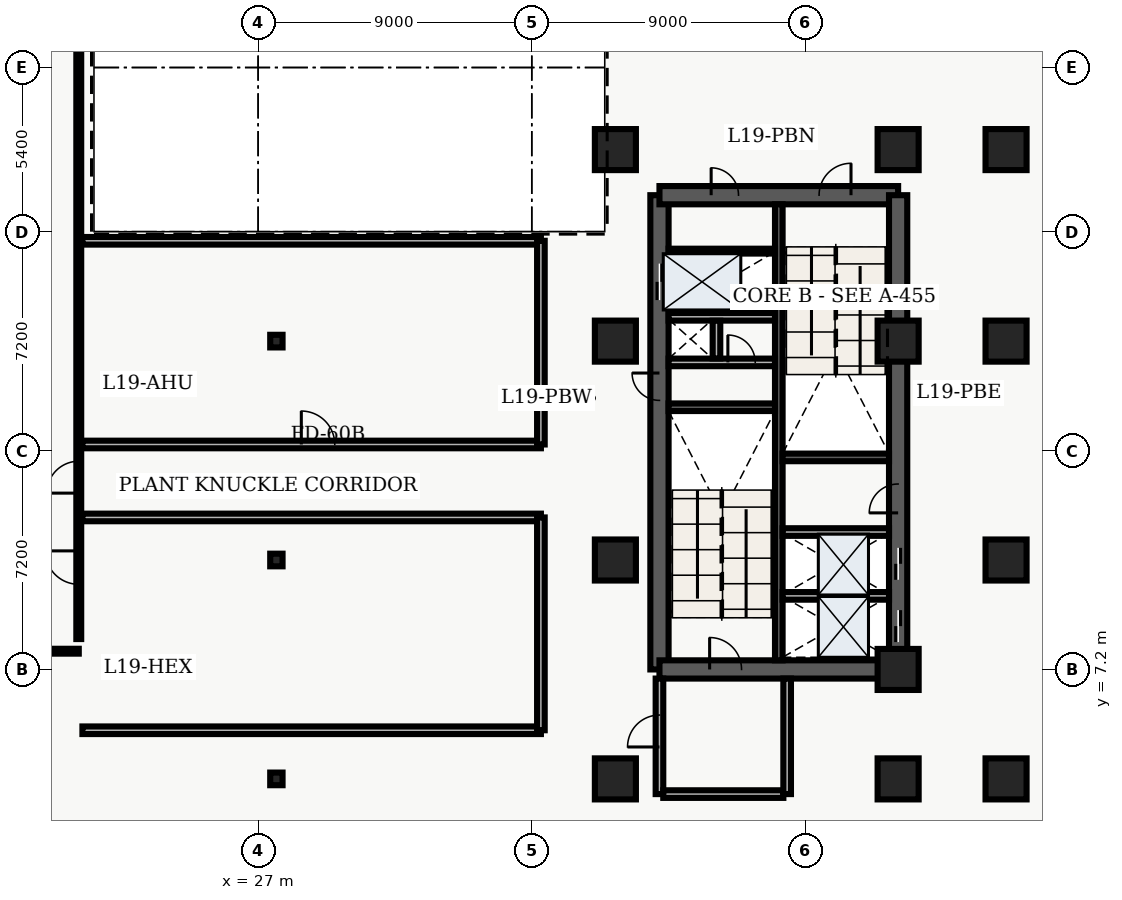
"""IFC4 building model, lengths in metres.
Left out: names, types, materials, properties, quantities, classifications, styles, units other than length and angle.
Written with IfcOpenShell. Run it as: python <this file> out.ifc"""

import sys

from ifc_helpers import new_model, entity, si_unit, converted_unit, direction, frame, origin_with_axes, origin_2d_with_axis, place, context, subcontext, project, spatial, polyline, rectangle, i_section, outline, extrude, element, fill, save


model = new_model("IFC4")
c1 = context("Model", 3, precision=1e-05, world=origin_with_axes(), true_north=direction((0.0, 1.0)))
c2 = subcontext(c1, "Body", "Model", "MODEL_VIEW")
j1 = project(units=[si_unit("LENGTHUNIT", "METRE"), converted_unit("PLANEANGLEUNIT", "DEGREE", entity("IfcPlaneAngleMeasure", 0.017), si_unit("PLANEANGLEUNIT", "RADIAN"), dimensions=[0, 0, 0, 0, 0, 0, 0])], contexts=[c1])
p1 = place(None, origin_with_axes())
s1 = spatial("IfcSite", under=j1, at=p1, CompositionType="ELEMENT")
p2 = place(p1, origin_with_axes())
s2 = spatial("IfcBuilding", under=s1, at=p2, CompositionType="ELEMENT")
p3 = place(p2, frame((0.0, 0.0, 79.5), z_axis=(0.0, 0.0, 1.0), x_axis=(1.0, 0.0, 0.0)))
s3 = spatial("IfcBuildingStorey", under=s2, at=p3, CompositionType="ELEMENT", Elevation=79.5)
p4 = place(p3, frame((40.2, 7.2, 0.0), z_axis=(0.0, 0.0, 1.0), x_axis=(0.0, 1.0, 0.0)))
e1 = element("IfcWall", 1, at=p4, inside=s3, PredefinedType="SHEAR", context=c2, shape_type="SweptSolid", body=[
    extrude(outline(polyline([(0.0, -0.3), (15.6, -0.3), (15.6, 0.3), (0.0, 0.3), (0.0, -0.3)])), origin_with_axes(), (0.0, 0.0, 1.0), 4.86),
])
p5 = place(p4, frame((12.75, 0.0, 0.0), z_axis=(0.0, 0.0, 1.0), x_axis=(1.0, 0.0, 0.0)))
e2 = element("IfcOpeningElement", 2, at=p5, cuts=e1, PredefinedType="OPENING", context=c2, shape_type="SweptSolid", body=[
    extrude(rectangle(XDim=1.2, YDim=0.62, at=origin_2d_with_axis()), origin_with_axes(), (0.0, 0.0, 1.0), 2.15),
])
p6 = place(p4, frame((9.3, 0.0, 0.0), z_axis=(0.0, 0.0, 1.0), x_axis=(1.0, 0.0, 0.0)))
e3 = element("IfcOpeningElement", 3, at=p6, cuts=e1, PredefinedType="OPENING", context=c2, shape_type="SweptSolid", body=[
    extrude(rectangle(XDim=0.9, YDim=0.62, at=origin_2d_with_axis()), origin_with_axes(), (0.0, 0.0, 1.0), 2.15),
])
p7 = place(p3, frame((40.2, 7.2, 0.0), z_axis=(0.0, 0.0, 1.0), x_axis=(1.0, 0.0, 0.0)))
e4 = element("IfcWall", 4, at=p7, inside=s3, PredefinedType="SHEAR", context=c2, shape_type="SweptSolid", body=[
    extrude(outline(polyline([(0.0, -0.3), (7.85, -0.3), (7.85, 0.3), (0.0, 0.3), (0.0, -0.3)])), origin_with_axes(), (0.0, 0.0, 1.0), 4.86),
])
p8 = place(p7, frame((2.175, 0.0, 0.0), z_axis=(0.0, 0.0, 1.0), x_axis=(1.0, 0.0, 0.0)))
e5 = element("IfcOpeningElement", 5, at=p8, cuts=e4, PredefinedType="OPENING", context=c2, shape_type="SweptSolid", body=[
    extrude(rectangle(XDim=1.05, YDim=0.62, at=origin_2d_with_axis()), origin_with_axes(), (0.0, 0.0, 1.0), 2.15),
])
p9 = place(p3, frame((40.2, 22.8, 0.0), z_axis=(0.0, 0.0, 1.0), x_axis=(1.0, 0.0, 0.0)))
e6 = element("IfcWall", 6, at=p9, inside=s3, PredefinedType="SHEAR", context=c2, shape_type="SweptSolid", body=[
    extrude(outline(polyline([(0.0, -0.3), (7.85, -0.3), (7.85, 0.3), (0.0, 0.3), (0.0, -0.3)])), origin_with_axes(), (0.0, 0.0, 1.0), 4.86),
])
p10 = place(p9, frame((5.775, 0.0, 0.0), z_axis=(0.0, 0.0, 1.0), x_axis=(1.0, 0.0, 0.0)))
e7 = element("IfcOpeningElement", 7, at=p10, cuts=e6, PredefinedType="OPENING", context=c2, shape_type="SweptSolid", body=[
    extrude(rectangle(XDim=1.05, YDim=0.62, at=origin_2d_with_axis()), origin_with_axes(), (0.0, 0.0, 1.0), 2.15),
])
p11 = place(p9, frame((2.15, 0.0, 0.0), z_axis=(0.0, 0.0, 1.0), x_axis=(1.0, 0.0, 0.0)))
e8 = element("IfcOpeningElement", 8, at=p11, cuts=e6, PredefinedType="OPENING", context=c2, shape_type="SweptSolid", body=[
    extrude(rectangle(XDim=0.9, YDim=0.62, at=origin_2d_with_axis()), origin_with_axes(), (0.0, 0.0, 1.0), 2.15),
])
p12 = place(p3, frame((48.05, 7.2, 0.0), z_axis=(0.0, 0.0, 1.0), x_axis=(0.0, 1.0, 0.0)))
e9 = element("IfcWall", 9, at=p12, inside=s3, PredefinedType="SHEAR", context=c2, shape_type="SweptSolid", body=[
    extrude(outline(polyline([(0.0, -0.3), (15.6, -0.3), (15.6, 0.3), (0.0, 0.3), (0.0, -0.3)])), origin_with_axes(), (0.0, 0.0, 1.0), 4.86),
])
p13 = place(p12, frame((1.425, 0.0, 0.0), z_axis=(0.0, 0.0, 1.0), x_axis=(1.0, 0.0, 0.0)))
e10 = element("IfcOpeningElement", 10, at=p13, cuts=e9, PredefinedType="OPENING", context=c2, shape_type="SweptSolid", body=[
    extrude(rectangle(XDim=1.05, YDim=0.62, at=origin_2d_with_axis()), origin_with_axes(), (0.0, 0.0, 1.0), 2.15),
])
p14 = place(p12, frame((3.475, 0.0, 0.0), z_axis=(0.0, 0.0, 1.0), x_axis=(1.0, 0.0, 0.0)))
e11 = element("IfcOpeningElement", 11, at=p14, cuts=e9, PredefinedType="OPENING", context=c2, shape_type="SweptSolid", body=[
    extrude(rectangle(XDim=1.05, YDim=0.62, at=origin_2d_with_axis()), origin_with_axes(), (0.0, 0.0, 1.0), 2.15),
])
p15 = place(p12, frame((5.625, 0.0, 0.0), z_axis=(0.0, 0.0, 1.0), x_axis=(1.0, 0.0, 0.0)))
e12 = element("IfcOpeningElement", 12, at=p15, cuts=e9, PredefinedType="OPENING", context=c2, shape_type="SweptSolid", body=[
    extrude(rectangle(XDim=0.95, YDim=0.62, at=origin_2d_with_axis()), origin_with_axes(), (0.0, 0.0, 1.0), 2.15),
])
p16 = place(p3, frame((44.125, 7.5, 0.0), z_axis=(0.0, 0.0, 1.0), x_axis=(0.0, 1.0, 0.0)))
e13 = element("IfcWall", 13, at=p16, inside=s3, PredefinedType="SHEAR", context=c2, shape_type="SweptSolid", body=[
    extrude(outline(polyline([(0.0, -0.125), (15.0, -0.125), (15.0, 0.125), (0.0, 0.125), (0.0, -0.125)])), origin_with_axes(), (0.0, 0.0, 1.0), 4.86),
])
for number, where, z_axis, x_axis in (
    (14, (40.5, 15.825, 0.0), (0.0, 0.0, 1.0), (1.0, 0.0, 0.0)),
    (15, (44.25, 14.175, 0.0), (0.0, 0.0, 1.0), (1.0, 0.0, 0.0)),
):
    element("IfcWall", number, at=place(p3, frame(where, z_axis=z_axis, x_axis=x_axis)), inside=s3, PredefinedType="SHEAR", context=c2, shape_type="SweptSolid", body=[
        extrude(outline(polyline([(0.0, -0.125), (3.5, -0.125), (3.5, 0.125), (0.0, 0.125), (0.0, -0.125)])), origin_with_axes(), (0.0, 0.0, 1.0), 4.86),
    ])
p17 = place(p3, frame((40.5, 17.3, 0.0), z_axis=(0.0, 0.0, 1.0), x_axis=(1.0, 0.0, 0.0)))
e16 = element("IfcWall", 16, at=p17, inside=s3, PredefinedType="SOLIDWALL", context=c2, shape_type="SweptSolid", body=[
    extrude(outline(polyline([(0.0, -0.125), (3.5, -0.125), (3.5, 0.125), (0.0, 0.125), (0.0, -0.125)])), origin_with_axes(), (0.0, 0.0, 1.0), 3.6),
])
p18 = place(p17, frame((2.4, 0.0, 0.0), z_axis=(0.0, 0.0, 1.0), x_axis=(1.0, 0.0, 0.0)))
e17 = element("IfcOpeningElement", 17, at=p18, cuts=e16, PredefinedType="OPENING", context=c2, shape_type="SweptSolid", body=[
    extrude(rectangle(XDim=0.9, YDim=0.27, at=origin_2d_with_axis()), origin_with_axes(), (0.0, 0.0, 1.0), 2.15),
])
p19 = place(p3, frame((40.5, 18.8, 0.0), z_axis=(0.0, 0.0, 1.0), x_axis=(1.0, 0.0, 0.0)))
e18 = element("IfcWall", 18, at=p19, inside=s3, PredefinedType="SOLIDWALL", context=c2, shape_type="SweptSolid", body=[
    extrude(outline(polyline([(0.0, -0.125), (3.5, -0.125), (3.5, 0.125), (0.0, 0.125), (0.0, -0.125)])), origin_with_axes(), (0.0, 0.0, 1.0), 3.6),
])
p20 = place(p3, frame((42.075, 17.43, 0.0), z_axis=(0.0, 0.0, 1.0), x_axis=(0.0, 1.0, 0.0)))
e19 = element("IfcWall", 19, at=p20, inside=s3, PredefinedType="SOLIDWALL", context=c2, shape_type="SweptSolid", body=[
    extrude(outline(polyline([(0.0, -0.125), (1.24, -0.125), (1.24, 0.125), (0.0, 0.125), (0.0, -0.125)])), origin_with_axes(), (0.0, 0.0, 1.0), 3.6),
])
p21 = place(p3, frame((40.2, 3.1, 0.0), z_axis=(0.0, 0.0, 1.0), x_axis=(0.0, 1.0, 0.0)))
e20 = element("IfcWall", 20, at=p21, inside=s3, PredefinedType="SOLIDWALL", context=c2, shape_type="SweptSolid", body=[
    extrude(outline(polyline([(0.0, -0.125), (3.8, -0.125), (3.8, 0.125), (0.0, 0.125), (0.0, -0.125)])), origin_with_axes(), (0.0, 0.0, 1.0), 3.6),
])
p22 = place(p21, frame((2.075, 0.0, 0.0), z_axis=(0.0, 0.0, 1.0), x_axis=(1.0, 0.0, 0.0)))
e21 = element("IfcOpeningElement", 21, at=p22, cuts=e20, PredefinedType="OPENING", context=c2, shape_type="SweptSolid", body=[
    extrude(rectangle(XDim=1.05, YDim=0.27, at=origin_2d_with_axis()), origin_with_axes(), (0.0, 0.0, 1.0), 2.15),
])
p23 = place(p3, frame((40.325, 3.1, 0.0), z_axis=(0.0, 0.0, 1.0), x_axis=(1.0, 0.0, 0.0)))
e22 = element("IfcWall", 22, at=p23, inside=s3, PredefinedType="SOLIDWALL", context=c2, shape_type="SweptSolid", body=[
    extrude(outline(polyline([(0.0, -0.125), (3.95, -0.125), (3.95, 0.125), (0.0, 0.125), (0.0, -0.125)])), origin_with_axes(), (0.0, 0.0, 1.0), 3.6),
])
p24 = place(p3, frame((44.4, 3.1, 0.0), z_axis=(0.0, 0.0, 1.0), x_axis=(0.0, 1.0, 0.0)))
e23 = element("IfcWall", 23, at=p24, inside=s3, PredefinedType="SOLIDWALL", context=c2, shape_type="SweptSolid", body=[
    extrude(outline(polyline([(0.0, -0.125), (3.8, -0.125), (3.8, 0.125), (0.0, 0.125), (0.0, -0.125)])), origin_with_axes(), (0.0, 0.0, 1.0), 3.6),
])
for number, where, z_axis, x_axis in (
    (24, (27.6, 3.6, 0.0), (0.0, 0.0, 1.0), (1.0, 0.0, 0.0)),
    (25, (27.6, 10.8, 0.0), (0.0, 0.0, 1.0), (1.0, 0.0, 0.0)),
    (26, (27.6, 18.0, 0.0), (0.0, 0.0, 1.0), (1.0, 0.0, 0.0)),
):
    element("IfcColumn", number, at=place(p3, frame(where, z_axis=z_axis, x_axis=x_axis)), inside=s3, PredefinedType="COLUMN", context=c2, shape_type="SweptSolid", body=[
        extrude(i_section(OverallWidth=0.406, OverallDepth=0.416, WebThickness=0.03, FlangeThickness=0.048, FilletRadius=0.022, at=origin_2d_with_axis()), origin_with_axes(), (0.0, 0.0, 1.0), 5.1),
    ])
for number, where, z_axis, x_axis in (
    (27, (38.75, 3.6, 0.0), (0.0, 0.0, 1.0), (1.0, 0.0, 0.0)),
    (28, (38.75, 10.8, 0.0), (0.0, 0.0, 1.0), (1.0, 0.0, 0.0)),
    (29, (38.75, 18.0, 0.0), (0.0, 0.0, 1.0), (1.0, 0.0, 0.0)),
    (30, (38.75, 24.3, 0.0), (0.0, 0.0, 1.0), (1.0, 0.0, 0.0)),
    (31, (48.05, 3.6, 0.0), (0.0, 0.0, 1.0), (1.0, 0.0, 0.0)),
    (32, (48.05, 7.2, 0.0), (0.0, 0.0, 1.0), (1.0, 0.0, 0.0)),
    (33, (48.05, 18.0, 0.0), (0.0, 0.0, 1.0), (1.0, 0.0, 0.0)),
    (34, (48.05, 24.3, 0.0), (0.0, 0.0, 1.0), (1.0, 0.0, 0.0)),
    (35, (51.6, 3.6, 0.0), (0.0, 0.0, 1.0), (1.0, 0.0, 0.0)),
    (36, (51.6, 10.8, 0.0), (0.0, 0.0, 1.0), (1.0, 0.0, 0.0)),
    (37, (51.6, 18.0, 0.0), (0.0, 0.0, 1.0), (1.0, 0.0, 0.0)),
    (38, (51.6, 24.3, 0.0), (0.0, 0.0, 1.0), (1.0, 0.0, 0.0)),
):
    element("IfcColumn", number, at=place(p3, frame(where, z_axis=z_axis, x_axis=x_axis)), inside=s3, PredefinedType="COLUMN", context=c2, shape_type="SweptSolid", body=[
        extrude(rectangle(XDim=1.35, YDim=1.35, at=origin_2d_with_axis()), origin_with_axes(), (0.0, 0.0, 1.0), 5.1),
    ])
p25 = place(p3, frame((40.5, 20.96, 0.0), z_axis=(0.0, 0.0, 1.0), x_axis=(1.0, 0.0, 0.0)))
e39 = element("IfcWall", 39, at=p25, inside=s3, PredefinedType="PARTITIONING", context=c2, shape_type="SweptSolid", body=[
    extrude(outline(polyline([(0.0, -0.08), (3.5, -0.08), (3.5, 0.08), (0.0, 0.08), (0.0, -0.08)])), origin_with_axes(), (0.0, 0.0, 1.0), 3.2),
])
for number, where, z_axis, x_axis in (
    (40, (44.25, 9.62, 0.0), (0.0, 0.0, 1.0), (1.0, 0.0, 0.0)),
    (41, (44.25, 11.72, 0.0), (0.0, 0.0, 1.0), (1.0, 0.0, 0.0)),
):
    element("IfcWall", number, at=place(p3, frame(where, z_axis=z_axis, x_axis=x_axis)), inside=s3, PredefinedType="SOLIDWALL", context=c2, shape_type="SweptSolid", body=[
        extrude(outline(polyline([(0.0, -0.125), (3.5, -0.125), (3.5, 0.125), (0.0, 0.125), (0.0, -0.125)])), origin_with_axes(), (0.0, 0.0, 1.0), 3.2),
    ])
p26 = place(p3, frame((21.1, 8.2, 0.0), z_axis=(0.0, 0.0, 1.0), x_axis=(0.0, 1.0, 0.0)))
e42 = element("IfcWall", 42, at=p26, inside=s3, PredefinedType="PARTITIONING", context=c2, shape_type="SweptSolid", body=[
    extrude(outline(polyline([(0.0, -0.08), (32.0, -0.08), (32.0, 0.08), (0.0, 0.08), (0.0, -0.08)])), origin_with_axes(), (0.0, 0.0, 1.0), 3.2),
])
p27 = place(p26, frame((5.325, 0.0, 0.0), z_axis=(0.0, 0.0, 1.0), x_axis=(1.0, 0.0, 0.0)))
e43 = element("IfcOpeningElement", 43, at=p27, cuts=e42, PredefinedType="OPENING", context=c2, shape_type="SweptSolid", body=[
    extrude(rectangle(XDim=1.05, YDim=0.18, at=origin_2d_with_axis()), origin_with_axes(), (0.0, 0.0, 1.0), 2.15),
])
p28 = place(p26, frame((2.35, 0.0, 0.0), z_axis=(0.0, 0.0, 1.0), x_axis=(1.0, 0.0, 0.0)))
e44 = element("IfcOpeningElement", 44, at=p28, cuts=e42, PredefinedType="OPENING", context=c2, shape_type="SweptSolid", body=[
    extrude(rectangle(XDim=1.1, YDim=0.18, at=origin_2d_with_axis()), origin_with_axes(), (0.0, 0.0, 1.0), 2.15),
])
p29 = place(p3, frame((4.8, 7.8, 0.0), z_axis=(0.0, 0.0, 1.0), x_axis=(1.0, 0.0, 0.0)))
e45 = element("IfcWall", 45, at=p29, inside=s3, PredefinedType="PARTITIONING", context=c2, shape_type="SweptSolid", body=[
    extrude(outline(polyline([(0.0, -0.08), (16.3, -0.08), (16.3, 0.08), (0.0, 0.08), (0.0, -0.08)])), origin_with_axes(), (0.0, 0.0, 1.0), 3.2),
])
for number, where, z_axis, x_axis in (
    (46, (21.22, 21.3, 0.0), (0.0, 0.0, 1.0), (1.0, 0.0, 0.0)),
    (47, (21.22, 12.2, 0.0), (0.0, 0.0, 1.0), (1.0, 0.0, 0.0)),
):
    element("IfcWall", number, at=place(p3, frame(where, z_axis=z_axis, x_axis=x_axis)), inside=s3, PredefinedType="SOLIDWALL", context=c2, shape_type="SweptSolid", body=[
        extrude(outline(polyline([(0.0, -0.125), (15.08, -0.125), (15.08, 0.125), (0.0, 0.125), (0.0, -0.125)])), origin_with_axes(), (0.0, 0.0, 1.0), 3.2),
    ])
p30 = place(p3, frame((21.22, 14.6, 0.0), z_axis=(0.0, 0.0, 1.0), x_axis=(1.0, 0.0, 0.0)))
e48 = element("IfcWall", 48, at=p30, inside=s3, PredefinedType="SOLIDWALL", context=c2, shape_type="SweptSolid", body=[
    extrude(outline(polyline([(0.0, -0.125), (15.08, -0.125), (15.08, 0.125), (0.0, 0.125), (0.0, -0.125)])), origin_with_axes(), (0.0, 0.0, 1.0), 3.2),
])
p31 = place(p30, frame((7.75, 0.0, 0.0), z_axis=(0.0, 0.0, 1.0), x_axis=(1.0, 0.0, 0.0)))
e49 = element("IfcOpeningElement", 49, at=p31, cuts=e48, PredefinedType="OPENING", context=c2, shape_type="SweptSolid", body=[
    extrude(rectangle(XDim=1.1, YDim=0.27, at=origin_2d_with_axis()), origin_with_axes(), (0.0, 0.0, 1.0), 2.15),
])
p32 = place(p3, frame((36.3, 14.6, 0.0), z_axis=(0.0, 0.0, 1.0), x_axis=(0.0, 1.0, 0.0)))
e50 = element("IfcWall", 50, at=p32, inside=s3, PredefinedType="SOLIDWALL", context=c2, shape_type="SweptSolid", body=[
    extrude(outline(polyline([(0.0, -0.125), (6.7, -0.125), (6.7, 0.125), (0.0, 0.125), (0.0, -0.125)])), origin_with_axes(), (0.0, 0.0, 1.0), 3.2),
])
p33 = place(p3, frame((21.22, 5.2, 0.0), z_axis=(0.0, 0.0, 1.0), x_axis=(1.0, 0.0, 0.0)))
e51 = element("IfcWall", 51, at=p33, inside=s3, PredefinedType="SOLIDWALL", context=c2, shape_type="SweptSolid", body=[
    extrude(outline(polyline([(0.0, -0.125), (15.08, -0.125), (15.08, 0.125), (0.0, 0.125), (0.0, -0.125)])), origin_with_axes(), (0.0, 0.0, 1.0), 3.2),
])
p34 = place(p3, frame((36.3, 5.2, 0.0), z_axis=(0.0, 0.0, 1.0), x_axis=(0.0, 1.0, 0.0)))
e52 = element("IfcWall", 52, at=p34, inside=s3, PredefinedType="SOLIDWALL", context=c2, shape_type="SweptSolid", body=[
    extrude(outline(polyline([(0.0, -0.125), (7.0, -0.125), (7.0, 0.125), (0.0, 0.125), (0.0, -0.125)])), origin_with_axes(), (0.0, 0.0, 1.0), 3.2),
])
p35 = place(p12, frame((1.425, 0.0, 0.0), z_axis=(0.0, 0.0, 1.0), x_axis=(1.0, 0.0, 0.0)))
e53 = element("IfcDoor", 53, at=p35, inside=s3, OperationType="SLIDING_TO_LEFT", PredefinedType="DOOR", context=c2, shape_type="SweptSolid", body=[
    extrude(rectangle(XDim=1.05, YDim=0.09, at=origin_2d_with_axis()), origin_with_axes(), (0.0, 0.0, 1.0), 2.15),
])
fill(e10, e53)
p36 = place(p12, frame((3.475, 0.0, 0.0), z_axis=(0.0, 0.0, 1.0), x_axis=(1.0, 0.0, 0.0)))
e54 = element("IfcDoor", 54, at=p36, inside=s3, OperationType="SLIDING_TO_RIGHT", PredefinedType="DOOR", context=c2, shape_type="SweptSolid", body=[
    extrude(rectangle(XDim=1.05, YDim=0.09, at=origin_2d_with_axis()), origin_with_axes(), (0.0, 0.0, 1.0), 2.15),
])
fill(e11, e54)
p37 = place(p4, frame((12.75, 0.0, 0.0), z_axis=(0.0, 0.0, 1.0), x_axis=(1.0, 0.0, 0.0)))
e55 = element("IfcDoor", 55, at=p37, inside=s3, OperationType="DOUBLE_DOOR_SLIDING", PredefinedType="DOOR", context=c2, shape_type="SweptSolid", body=[
    extrude(rectangle(XDim=1.2, YDim=0.09, at=origin_2d_with_axis()), origin_with_axes(), (0.0, 0.0, 1.0), 2.15),
])
fill(e2, e55)
p38 = place(p4, frame((9.3, 0.0, 0.0), z_axis=(0.0, 0.0, 1.0), x_axis=(1.0, 0.0, 0.0)))
e56 = element("IfcDoor", 56, at=p38, inside=s3, OperationType="SINGLE_SWING_RIGHT", PredefinedType="DOOR", context=c2, shape_type="SweptSolid", body=[
    extrude(rectangle(XDim=0.9, YDim=0.09, at=origin_2d_with_axis()), origin_with_axes(), (0.0, 0.0, 1.0), 2.15),
])
fill(e3, e56)
p39 = place(p17, frame((2.4, 0.0, 0.0), z_axis=(0.0, 0.0, 1.0), x_axis=(1.0, 0.0, 0.0)))
e57 = element("IfcDoor", 57, at=p39, inside=s3, OperationType="SINGLE_SWING_LEFT", PredefinedType="DOOR", context=c2, shape_type="SweptSolid", body=[
    extrude(rectangle(XDim=0.9, YDim=0.09, at=origin_2d_with_axis()), origin_with_axes(), (0.0, 0.0, 1.0), 2.15),
])
fill(e17, e57)
p40 = place(p7, frame((2.175, 0.0, 0.0), z_axis=(0.0, 0.0, 1.0), x_axis=(1.0, 0.0, 0.0)))
e58 = element("IfcDoor", 58, at=p40, inside=s3, OperationType="SINGLE_SWING_LEFT", PredefinedType="DOOR", context=c2, shape_type="SweptSolid", body=[
    extrude(rectangle(XDim=1.05, YDim=0.09, at=origin_2d_with_axis()), origin_with_axes(), (0.0, 0.0, 1.0), 2.15),
])
fill(e5, e58)
p41 = place(p9, frame((5.775, 0.0, 0.0), z_axis=(0.0, 0.0, 1.0), x_axis=(1.0, 0.0, 0.0)))
e59 = element("IfcDoor", 59, at=p41, inside=s3, OperationType="SINGLE_SWING_RIGHT", PredefinedType="DOOR", context=c2, shape_type="SweptSolid", body=[
    extrude(rectangle(XDim=1.05, YDim=0.09, at=origin_2d_with_axis()), origin_with_axes(), (0.0, 0.0, 1.0), 2.15),
])
fill(e7, e59)
p42 = place(p21, frame((2.075, 0.0, 0.0), z_axis=(0.0, 0.0, 1.0), x_axis=(1.0, 0.0, 0.0)))
e60 = element("IfcDoor", 60, at=p42, inside=s3, OperationType="SINGLE_SWING_LEFT", PredefinedType="DOOR", context=c2, shape_type="SweptSolid", body=[
    extrude(rectangle(XDim=1.05, YDim=0.09, at=origin_2d_with_axis()), origin_with_axes(), (0.0, 0.0, 1.0), 2.15),
])
fill(e21, e60)
p43 = place(p9, frame((2.15, 0.0, 0.0), z_axis=(0.0, 0.0, 1.0), x_axis=(1.0, 0.0, 0.0)))
e61 = element("IfcDoor", 61, at=p43, inside=s3, OperationType="SINGLE_SWING_LEFT", PredefinedType="DOOR", context=c2, shape_type="SweptSolid", body=[
    extrude(rectangle(XDim=0.9, YDim=0.09, at=origin_2d_with_axis()), origin_with_axes(), (0.0, 0.0, 1.0), 2.15),
])
fill(e8, e61)
p44 = place(p12, frame((5.625, 0.0, 0.0), z_axis=(0.0, 0.0, 1.0), x_axis=(1.0, 0.0, 0.0)))
e62 = element("IfcDoor", 62, at=p44, inside=s3, OperationType="SINGLE_SWING_LEFT", PredefinedType="DOOR", context=c2, shape_type="SweptSolid", body=[
    extrude(rectangle(XDim=0.95, YDim=0.09, at=origin_2d_with_axis()), origin_with_axes(), (0.0, 0.0, 1.0), 2.15),
])
fill(e12, e62)
p45 = place(p30, frame((7.75, 0.0, 0.0), z_axis=(0.0, 0.0, 1.0), x_axis=(1.0, 0.0, 0.0)))
e63 = element("IfcDoor", 63, at=p45, inside=s3, OperationType="SINGLE_SWING_LEFT", PredefinedType="DOOR", context=c2, shape_type="SweptSolid", body=[
    extrude(rectangle(XDim=1.1, YDim=0.09, at=origin_2d_with_axis()), origin_with_axes(), (0.0, 0.0, 1.0), 2.15),
])
fill(e49, e63)
p46 = place(p26, frame((5.325, 0.0, 0.0), z_axis=(0.0, 0.0, 1.0), x_axis=(1.0, 0.0, 0.0)))
e64 = element("IfcDoor", 64, at=p46, inside=s3, OperationType="SINGLE_SWING_LEFT", PredefinedType="DOOR", context=c2, shape_type="SweptSolid", body=[
    extrude(rectangle(XDim=1.05, YDim=0.09, at=origin_2d_with_axis()), origin_with_axes(), (0.0, 0.0, 1.0), 2.15),
])
fill(e43, e64)
p47 = place(p26, frame((2.35, 0.0, 0.0), z_axis=(0.0, 0.0, 1.0), x_axis=(1.0, 0.0, 0.0)))
e65 = element("IfcDoor", 65, at=p47, inside=s3, OperationType="SINGLE_SWING_RIGHT", PredefinedType="DOOR", context=c2, shape_type="SweptSolid", body=[
    extrude(rectangle(XDim=1.1, YDim=0.09, at=origin_2d_with_axis()), origin_with_axes(), (0.0, 0.0, 1.0), 2.15),
])
fill(e44, e65)
save(model, sys.argv[1])
